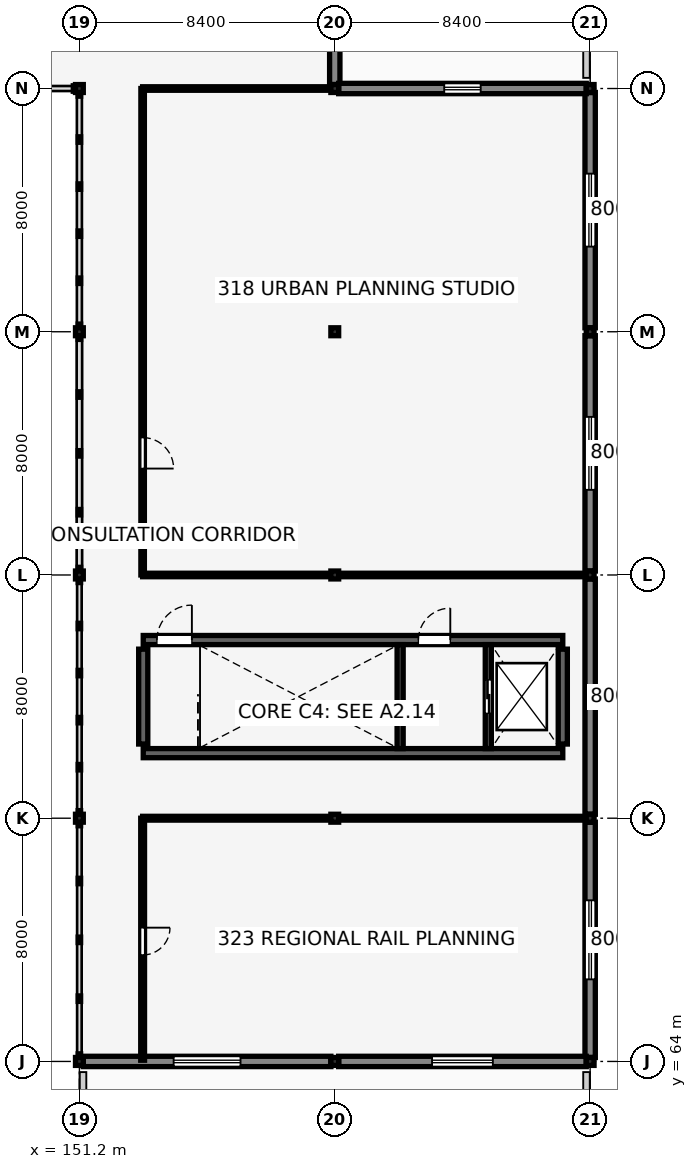
"""IFC4 building model, lengths in metres.
Left out: names, types, materials, properties, quantities, classifications, styles, units other than length and angle.
Written with IfcOpenShell. Run it as: python <this file> out.ifc"""

import sys

from ifc_helpers import new_model, si_unit, direction, frame, frame_2d, origin, origin_2d, place, context, subcontext, project, spatial, rectangle, i_section, extrude, element, fill, save


model = new_model("IFC4")
c1 = context("Model", 3, precision=1e-05, world=origin(), true_north=direction((0.0, 1.0)))
c2 = subcontext(c1, "Body", "Model", "MODEL_VIEW")
j1 = project(units=[si_unit("LENGTHUNIT", "METRE"), si_unit("PLANEANGLEUNIT", "RADIAN")], contexts=[c1])
p1 = place(None, origin())
s1 = spatial("IfcSite", under=j1, at=p1, CompositionType="ELEMENT")
p2 = place(p1, origin())
s2 = spatial("IfcBuilding", under=s1, at=p2, CompositionType="ELEMENT")
p3 = place(p2, frame((0.0, 0.0, 13.36)))
s3 = spatial("IfcBuildingStorey", under=s2, at=p3, CompositionType="ELEMENT", Elevation=13.36)
p4 = place(p3, frame((153.3, 74.14, 0.0), z_axis=(0.0, 0.0, 1.0), x_axis=(1.0, 0.0, 0.0)))
e1 = element("IfcWall", 1, at=p4, inside=s3, PredefinedType="SHEAR", context=c2, shape_type="SweptSolid", body=[
    extrude(rectangle(XDim=13.8, YDim=0.3, at=frame_2d((6.9, 0.0))), origin(), (0.0, 0.0, 1.0), 3.58),
])
p5 = place(p3, frame((153.3, 77.86, 0.0), z_axis=(0.0, 0.0, 1.0), x_axis=(1.0, 0.0, 0.0)))
e2 = element("IfcWall", 2, at=p5, inside=s3, PredefinedType="SHEAR", context=c2, shape_type="SweptSolid", body=[
    extrude(rectangle(XDim=13.8, YDim=0.3, at=frame_2d((6.9, 0.0))), origin(), (0.0, 0.0, 1.0), 3.58),
])
p6 = place(p5, frame((0.45, 0.0, 0.0), z_axis=(0.0, 0.0, 1.0), x_axis=(1.0, 0.0, 0.0)))
e3 = element("IfcOpeningElement", 3, at=p6, cuts=e2, PredefinedType="OPENING", context=c2, shape_type="SweptSolid", body=[
    extrude(rectangle(XDim=1.15, YDim=2.15, at=frame_2d((0.575, 1.075))), frame((0.0, 0.16, 0.0), z_axis=(0.0, -1.0, 0.0), x_axis=(1.0, 0.0, 0.0)), (0.0, 0.0, 1.0), 0.32),
])
p7 = place(p5, frame((9.05, 0.0, 0.0), z_axis=(0.0, 0.0, 1.0), x_axis=(1.0, 0.0, 0.0)))
e4 = element("IfcOpeningElement", 4, at=p7, cuts=e2, PredefinedType="OPENING", context=c2, shape_type="SweptSolid", body=[
    extrude(rectangle(XDim=1.05, YDim=2.15, at=frame_2d((0.525, 1.075))), frame((0.0, 0.16, 0.0), z_axis=(0.0, -1.0, 0.0), x_axis=(1.0, 0.0, 0.0)), (0.0, 0.0, 1.0), 0.32),
])
for number, where, z_axis, x_axis in (
    (5, (153.3, 74.44, 0.0), (0.0, 0.0, 1.0), (0.0, 1.0, 0.0)),
    (6, (167.1, 74.44, 0.0), (0.0, 0.0, 1.0), (0.0, 1.0, 0.0)),
):
    element("IfcWall", number, at=place(p3, frame(where, z_axis=z_axis, x_axis=x_axis)), inside=s3, PredefinedType="SHEAR", context=c2, shape_type="SweptSolid", body=[
        extrude(rectangle(XDim=3.12, YDim=0.3, at=frame_2d((1.56, 0.0))), origin(), (0.0, 0.0, 1.0), 3.58),
    ])
for number, where, z_axis, x_axis in (
    (7, (151.2, 64.0, 0.0), (0.0, 0.0, 1.0), (1.0, 0.0, 0.0)),
    (8, (151.2, 72.0, 0.0), (0.0, 0.0, 1.0), (1.0, 0.0, 0.0)),
    (9, (151.2, 80.0, 0.0), (0.0, 0.0, 1.0), (1.0, 0.0, 0.0)),
    (10, (151.2, 88.0, 0.0), (0.0, 0.0, 1.0), (1.0, 0.0, 0.0)),
    (11, (151.2, 96.0, 0.0), (0.0, 0.0, 1.0), (1.0, 0.0, 0.0)),
    (12, (159.6, 64.0, 0.0), (0.0, 0.0, 1.0), (1.0, 0.0, 0.0)),
    (13, (159.6, 72.0, 0.0), (0.0, 0.0, 1.0), (1.0, 0.0, 0.0)),
    (14, (159.6, 80.0, 0.0), (0.0, 0.0, 1.0), (1.0, 0.0, 0.0)),
    (15, (159.6, 88.0, 0.0), (0.0, 0.0, 1.0), (1.0, 0.0, 0.0)),
    (16, (159.6, 96.0, 0.0), (0.0, 0.0, 1.0), (1.0, 0.0, 0.0)),
    (17, (168.0, 64.0, 0.0), (0.0, 0.0, 1.0), (1.0, 0.0, 0.0)),
    (18, (168.0, 72.0, 0.0), (0.0, 0.0, 1.0), (1.0, 0.0, 0.0)),
    (19, (168.0, 80.0, 0.0), (0.0, 0.0, 1.0), (1.0, 0.0, 0.0)),
    (20, (168.0, 88.0, 0.0), (0.0, 0.0, 1.0), (1.0, 0.0, 0.0)),
    (21, (168.0, 96.0, 0.0), (0.0, 0.0, 1.0), (1.0, 0.0, 0.0)),
):
    element("IfcColumn", number, at=place(p3, frame(where, z_axis=z_axis, x_axis=x_axis)), inside=s3, PredefinedType="COLUMN", context=c2, shape_type="SweptSolid", body=[
        extrude(i_section(OverallWidth=0.256, OverallDepth=0.26, WebThickness=0.01, FlangeThickness=0.017, FilletRadius=0.013, at=origin_2d()), origin(), (0.0, 0.0, 1.0), 3.58),
    ])
p8 = place(p3, frame((168.0, 64.13, 0.0), z_axis=(0.0, 0.0, 1.0), x_axis=(0.0, 1.0, 0.0)))
e22 = element("IfcWall", 22, at=p8, inside=s3, PredefinedType="SOLIDWALL", context=c2, shape_type="SweptSolid", body=[
    extrude(rectangle(XDim=7.74, YDim=0.34, at=frame_2d((3.87, 0.0))), origin(), (0.0, 0.0, 1.0), 3.28),
])
p9 = place(p8, frame((2.57, 0.0, 0.9), z_axis=(0.0, 0.0, 1.0), x_axis=(1.0, 0.0, 0.0)))
e23 = element("IfcOpeningElement", 23, at=p9, cuts=e22, PredefinedType="OPENING", context=c2, shape_type="SweptSolid", body=[
    extrude(rectangle(XDim=2.6, YDim=1.8, at=frame_2d((1.3, 0.9))), frame((0.0, 0.18, 0.0), z_axis=(0.0, -1.0, 0.0), x_axis=(1.0, 0.0, 0.0)), (0.0, 0.0, 1.0), 0.36),
])
p10 = place(p3, frame((168.0, 72.13, 0.0), z_axis=(0.0, 0.0, 1.0), x_axis=(0.0, 1.0, 0.0)))
e24 = element("IfcWall", 24, at=p10, inside=s3, PredefinedType="SOLIDWALL", context=c2, shape_type="SweptSolid", body=[
    extrude(rectangle(XDim=7.74, YDim=0.34, at=frame_2d((3.87, 0.0))), origin(), (0.0, 0.0, 1.0), 3.28),
])
p11 = place(p3, frame((168.0, 80.13, 0.0), z_axis=(0.0, 0.0, 1.0), x_axis=(0.0, 1.0, 0.0)))
e25 = element("IfcWall", 25, at=p11, inside=s3, PredefinedType="SOLIDWALL", context=c2, shape_type="SweptSolid", body=[
    extrude(rectangle(XDim=7.74, YDim=0.34, at=frame_2d((3.87, 0.0))), origin(), (0.0, 0.0, 1.0), 3.28),
])
p12 = place(p11, frame((2.67, 0.0, 0.9), z_axis=(0.0, 0.0, 1.0), x_axis=(1.0, 0.0, 0.0)))
e26 = element("IfcOpeningElement", 26, at=p12, cuts=e25, PredefinedType="OPENING", context=c2, shape_type="SweptSolid", body=[
    extrude(rectangle(XDim=2.4, YDim=1.75, at=frame_2d((1.2, 0.875))), frame((0.0, 0.18, 0.0), z_axis=(0.0, -1.0, 0.0), x_axis=(1.0, 0.0, 0.0)), (0.0, 0.0, 1.0), 0.36),
])
p13 = place(p3, frame((168.0, 88.13, 0.0), z_axis=(0.0, 0.0, 1.0), x_axis=(0.0, 1.0, 0.0)))
e27 = element("IfcWall", 27, at=p13, inside=s3, PredefinedType="SOLIDWALL", context=c2, shape_type="SweptSolid", body=[
    extrude(rectangle(XDim=7.74, YDim=0.34, at=frame_2d((3.87, 0.0))), origin(), (0.0, 0.0, 1.0), 3.28),
])
p14 = place(p13, frame((2.67, 0.0, 0.9), z_axis=(0.0, 0.0, 1.0), x_axis=(1.0, 0.0, 0.0)))
e28 = element("IfcOpeningElement", 28, at=p14, cuts=e27, PredefinedType="OPENING", context=c2, shape_type="SweptSolid", body=[
    extrude(rectangle(XDim=2.4, YDim=1.5, at=frame_2d((1.2, 0.75))), frame((0.0, 0.18, 0.0), z_axis=(0.0, -1.0, 0.0), x_axis=(1.0, 0.0, 0.0)), (0.0, 0.0, 1.0), 0.36),
])
p15 = place(p3, frame((151.328, 64.0, 0.0), z_axis=(0.0, 0.0, 1.0), x_axis=(1.0, 0.0, 0.0)))
e29 = element("IfcWall", 29, at=p15, inside=s3, PredefinedType="SOLIDWALL", context=c2, shape_type="SweptSolid", body=[
    extrude(rectangle(XDim=8.144, YDim=0.34, at=frame_2d((4.072, 0.0))), origin(), (0.0, 0.0, 1.0), 3.28),
])
p16 = place(p15, frame((2.972, 0.0, 0.9), z_axis=(0.0, 0.0, 1.0), x_axis=(1.0, 0.0, 0.0)))
e30 = element("IfcOpeningElement", 30, at=p16, cuts=e29, PredefinedType="OPENING", context=c2, shape_type="SweptSolid", body=[
    extrude(rectangle(XDim=2.2, YDim=1.5, at=frame_2d((1.1, 0.75))), frame((0.0, 0.18, 0.0), z_axis=(0.0, -1.0, 0.0), x_axis=(1.0, 0.0, 0.0)), (0.0, 0.0, 1.0), 0.36),
])
p17 = place(p3, frame((159.728, 64.0, 0.0), z_axis=(0.0, 0.0, 1.0), x_axis=(1.0, 0.0, 0.0)))
e31 = element("IfcWall", 31, at=p17, inside=s3, PredefinedType="SOLIDWALL", context=c2, shape_type="SweptSolid", body=[
    extrude(rectangle(XDim=8.144, YDim=0.34, at=frame_2d((4.072, 0.0))), origin(), (0.0, 0.0, 1.0), 3.28),
])
p18 = place(p17, frame((3.072, 0.0, 0.9), z_axis=(0.0, 0.0, 1.0), x_axis=(1.0, 0.0, 0.0)))
e32 = element("IfcOpeningElement", 32, at=p18, cuts=e31, PredefinedType="OPENING", context=c2, shape_type="SweptSolid", body=[
    extrude(rectangle(XDim=2.0, YDim=1.5, at=frame_2d((1.0, 0.75))), frame((0.0, 0.18, 0.0), z_axis=(0.0, -1.0, 0.0), x_axis=(1.0, 0.0, 0.0)), (0.0, 0.0, 1.0), 0.36),
])
p19 = place(p3, frame((159.6, 96.13, 0.0), z_axis=(0.0, 0.0, 1.0), x_axis=(0.0, 1.0, 0.0)))
e33 = element("IfcWall", 33, at=p19, inside=s3, PredefinedType="SOLIDWALL", context=c2, shape_type="SweptSolid", body=[
    extrude(rectangle(XDim=7.74, YDim=0.34, at=frame_2d((3.87, 0.0))), origin(), (0.0, 0.0, 1.0), 3.28),
])
p20 = place(p19, frame((3.395, 0.0, 0.65), z_axis=(0.0, 0.0, 1.0), x_axis=(1.0, 0.0, 0.0)))
e34 = element("IfcOpeningElement", 34, at=p20, cuts=e33, PredefinedType="OPENING", context=c2, shape_type="SweptSolid", body=[
    extrude(rectangle(XDim=0.95, YDim=2.1, at=frame_2d((0.475, 1.05))), frame((0.0, 0.18, 0.0), z_axis=(0.0, -1.0, 0.0), x_axis=(1.0, 0.0, 0.0)), (0.0, 0.0, 1.0), 0.36),
])
p21 = place(p3, frame((159.728, 96.0, 0.0), z_axis=(0.0, 0.0, 1.0), x_axis=(1.0, 0.0, 0.0)))
e35 = element("IfcWall", 35, at=p21, inside=s3, PredefinedType="SOLIDWALL", context=c2, shape_type="SweptSolid", body=[
    extrude(rectangle(XDim=8.144, YDim=0.34, at=frame_2d((4.072, 0.0))), origin(), (0.0, 0.0, 1.0), 3.28),
])
p22 = place(p21, frame((3.472, 0.0, 1.55), z_axis=(0.0, 0.0, 1.0), x_axis=(1.0, 0.0, 0.0)))
e36 = element("IfcOpeningElement", 36, at=p22, cuts=e35, PredefinedType="OPENING", context=c2, shape_type="SweptSolid", body=[
    extrude(rectangle(XDim=1.2, YDim=0.95, at=frame_2d((0.6, 0.475))), frame((0.0, 0.18, 0.0), z_axis=(0.0, -1.0, 0.0), x_axis=(1.0, 0.0, 0.0)), (0.0, 0.0, 1.0), 0.36),
])
for number, where, z_axis, x_axis in (
    (37, (167.88, 63.65, 0.0), (0.0, 0.0, 1.0), (0.0, -1.0, 0.0)),
    (38, (151.32, 56.12, 0.0), (0.0, 0.0, 1.0), (0.0, 1.0, 0.0)),
):
    element("IfcWall", number, at=place(p3, frame(where, z_axis=z_axis, x_axis=x_axis)), inside=s3, PredefinedType="PARAPET", context=c2, shape_type="SweptSolid", body=[
        extrude(rectangle(XDim=7.53, YDim=0.215, at=frame_2d((3.765, 0.0))), origin(), (0.0, 0.0, 1.0), 1.05),
    ])
p23 = place(p3, frame((167.88, 111.88, 0.0), z_axis=(0.0, 0.0, 1.0), x_axis=(0.0, -1.0, 0.0)))
e39 = element("IfcWall", 39, at=p23, inside=s3, PredefinedType="PARAPET", context=c2, shape_type="SweptSolid", body=[
    extrude(rectangle(XDim=15.53, YDim=0.215, at=frame_2d((7.765, 0.0))), origin(), (0.0, 0.0, 1.0), 1.05),
])
p24 = place(p3, frame((161.75, 74.29, 0.0), z_axis=(0.0, 0.0, 1.0), x_axis=(0.0, 1.0, 0.0)))
e40 = element("IfcWall", 40, at=p24, inside=s3, PredefinedType="SHEAR", context=c2, shape_type="SweptSolid", body=[
    extrude(rectangle(XDim=3.42, YDim=0.2, at=frame_2d((1.71, 0.0))), origin(), (0.0, 0.0, 1.0), 3.58),
])
p25 = place(p3, frame((164.65, 74.29, 0.0), z_axis=(0.0, 0.0, 1.0), x_axis=(0.0, 1.0, 0.0)))
e41 = element("IfcWall", 41, at=p25, inside=s3, PredefinedType="SHEAR", context=c2, shape_type="SweptSolid", body=[
    extrude(rectangle(XDim=3.42, YDim=0.2, at=frame_2d((1.71, 0.0))), origin(), (0.0, 0.0, 1.0), 3.58),
])
p26 = place(p25, frame((1.16, 0.0, 0.0), z_axis=(0.0, 0.0, 1.0), x_axis=(1.0, 0.0, 0.0)))
e42 = element("IfcOpeningElement", 42, at=p26, cuts=e41, PredefinedType="OPENING", context=c2, shape_type="SweptSolid", body=[
    extrude(rectangle(XDim=1.1, YDim=2.15, at=frame_2d((0.55, 1.075))), frame((0.0, 0.11, 0.0), z_axis=(0.0, -1.0, 0.0), x_axis=(1.0, 0.0, 0.0)), (0.0, 0.0, 1.0), 0.22),
])
p27 = place(p3, frame((153.28, 64.04, 0.0), z_axis=(0.0, 0.0, 1.0), x_axis=(0.0, 1.0, 0.0)))
e43 = element("IfcWall", 43, at=p27, inside=s3, PredefinedType="PARTITIONING", context=c2, shape_type="SweptSolid", body=[
    extrude(rectangle(XDim=7.96, YDim=0.125, at=frame_2d((3.98, 0.0))), origin(), (0.0, 0.0, 1.0), 3.58),
])
p28 = place(p27, frame((4.36, 0.0, 0.0), z_axis=(0.0, 0.0, 1.0), x_axis=(-1.0, 0.0, 0.0)))
e44 = element("IfcOpeningElement", 44, at=p28, cuts=e43, PredefinedType="OPENING", context=c2, shape_type="SweptSolid", body=[
    extrude(rectangle(XDim=0.9, YDim=2.1, at=frame_2d((0.45, 1.05))), frame((0.0, 0.073, 0.0), z_axis=(0.0, -1.0, 0.0), x_axis=(1.0, 0.0, 0.0)), (0.0, 0.0, 1.0), 0.145),
])
p29 = place(p3, frame((153.28, 80.0, 0.0), z_axis=(0.0, 0.0, 1.0), x_axis=(0.0, 1.0, 0.0)))
e45 = element("IfcWall", 45, at=p29, inside=s3, PredefinedType="PARTITIONING", context=c2, shape_type="SweptSolid", body=[
    extrude(rectangle(XDim=16.0, YDim=0.115, at=frame_2d((8.0, 0.0))), origin(), (0.0, 0.0, 1.0), 3.58),
])
p30 = place(p29, frame((4.52, 0.0, 0.0), z_axis=(0.0, 0.0, 1.0), x_axis=(-1.0, 0.0, 0.0)))
e46 = element("IfcOpeningElement", 46, at=p30, cuts=e45, PredefinedType="OPENING", context=c2, shape_type="SweptSolid", body=[
    extrude(rectangle(XDim=1.02, YDim=2.16, at=frame_2d((0.51, 1.08))), frame((0.0, 0.067, 0.0), z_axis=(0.0, -1.0, 0.0), x_axis=(1.0, 0.0, 0.0)), (0.0, 0.0, 1.0), 0.135),
])
p31 = place(p3, frame((153.28, 72.0, 0.0), z_axis=(0.0, 0.0, 1.0), x_axis=(1.0, 0.0, 0.0)))
e47 = element("IfcWall", 47, at=p31, inside=s3, PredefinedType="PARTITIONING", context=c2, shape_type="SweptSolid", body=[
    extrude(rectangle(XDim=6.202, YDim=0.125, at=frame_2d((3.101, 0.0))), origin(), (0.0, 0.0, 1.0), 3.123),
])
p32 = place(p3, frame((159.718, 72.0, 0.0), z_axis=(0.0, 0.0, 1.0), x_axis=(1.0, 0.0, 0.0)))
e48 = element("IfcWall", 48, at=p32, inside=s3, PredefinedType="PARTITIONING", context=c2, shape_type="SweptSolid", body=[
    extrude(rectangle(XDim=8.164, YDim=0.125, at=frame_2d((4.082, 0.0))), origin(), (0.0, 0.0, 1.0), 3.123),
])
p33 = place(p3, frame((153.28, 80.0, 0.0), z_axis=(0.0, 0.0, 1.0), x_axis=(1.0, 0.0, 0.0)))
e49 = element("IfcWall", 49, at=p33, inside=s3, PredefinedType="PARTITIONING", context=c2, shape_type="SweptSolid", body=[
    extrude(rectangle(XDim=6.202, YDim=0.115, at=frame_2d((3.101, 0.0))), origin(), (0.0, 0.0, 1.0), 3.123),
])
p34 = place(p3, frame((159.718, 80.0, 0.0), z_axis=(0.0, 0.0, 1.0), x_axis=(1.0, 0.0, 0.0)))
e50 = element("IfcWall", 50, at=p34, inside=s3, PredefinedType="PARTITIONING", context=c2, shape_type="SweptSolid", body=[
    extrude(rectangle(XDim=8.164, YDim=0.115, at=frame_2d((4.082, 0.0))), origin(), (0.0, 0.0, 1.0), 3.123),
])
p35 = place(p3, frame((153.28, 96.0, 0.0), z_axis=(0.0, 0.0, 1.0), x_axis=(1.0, 0.0, 0.0)))
e51 = element("IfcWall", 51, at=p35, inside=s3, PredefinedType="PARTITIONING", context=c2, shape_type="SweptSolid", body=[
    extrude(rectangle(XDim=6.202, YDim=0.115, at=frame_2d((3.101, 0.0))), origin(), (0.0, 0.0, 1.0), 3.123),
])
p36 = place(p9, origin())
e52 = element("IfcWindow", 52, at=p36, inside=s3, PartitioningType="DOUBLE_PANEL_VERTICAL", PredefinedType="WINDOW", context=c2, shape_type="SweptSolid", body=[
    extrude(rectangle(XDim=2.6, YDim=1.8, at=frame_2d((1.3, 0.9))), frame((0.0, 0.03, 0.0), z_axis=(0.0, -1.0, 0.0), x_axis=(1.0, 0.0, 0.0)), (0.0, 0.0, 1.0), 0.06),
])
fill(e23, e52)
p37 = place(p12, origin())
e53 = element("IfcWindow", 53, at=p37, inside=s3, PartitioningType="DOUBLE_PANEL_VERTICAL", PredefinedType="WINDOW", context=c2, shape_type="SweptSolid", body=[
    extrude(rectangle(XDim=2.4, YDim=1.75, at=frame_2d((1.2, 0.875))), frame((0.0, 0.03, 0.0), z_axis=(0.0, -1.0, 0.0), x_axis=(1.0, 0.0, 0.0)), (0.0, 0.0, 1.0), 0.06),
])
fill(e26, e53)
p38 = place(p14, origin())
e54 = element("IfcWindow", 54, at=p38, inside=s3, PartitioningType="DOUBLE_PANEL_VERTICAL", PredefinedType="WINDOW", context=c2, shape_type="SweptSolid", body=[
    extrude(rectangle(XDim=2.4, YDim=1.5, at=frame_2d((1.2, 0.75))), frame((0.0, 0.03, 0.0), z_axis=(0.0, -1.0, 0.0), x_axis=(1.0, 0.0, 0.0)), (0.0, 0.0, 1.0), 0.06),
])
fill(e28, e54)
p39 = place(p16, origin())
e55 = element("IfcWindow", 55, at=p39, inside=s3, PartitioningType="DOUBLE_PANEL_VERTICAL", PredefinedType="WINDOW", context=c2, shape_type="SweptSolid", body=[
    extrude(rectangle(XDim=2.2, YDim=1.5, at=frame_2d((1.1, 0.75))), frame((0.0, 0.03, 0.0), z_axis=(0.0, -1.0, 0.0), x_axis=(1.0, 0.0, 0.0)), (0.0, 0.0, 1.0), 0.06),
])
fill(e30, e55)
p40 = place(p18, origin())
e56 = element("IfcWindow", 56, at=p40, inside=s3, PartitioningType="DOUBLE_PANEL_VERTICAL", PredefinedType="WINDOW", context=c2, shape_type="SweptSolid", body=[
    extrude(rectangle(XDim=2.0, YDim=1.5, at=frame_2d((1.0, 0.75))), frame((0.0, 0.03, 0.0), z_axis=(0.0, -1.0, 0.0), x_axis=(1.0, 0.0, 0.0)), (0.0, 0.0, 1.0), 0.06),
])
fill(e32, e56)
p41 = place(p22, origin())
e57 = element("IfcWindow", 57, at=p41, inside=s3, PartitioningType="SINGLE_PANEL", PredefinedType="WINDOW", context=c2, shape_type="SweptSolid", body=[
    extrude(rectangle(XDim=1.2, YDim=0.95, at=frame_2d((0.6, 0.475))), frame((0.0, 0.03, 0.0), z_axis=(0.0, -1.0, 0.0), x_axis=(1.0, 0.0, 0.0)), (0.0, 0.0, 1.0), 0.06),
])
fill(e36, e57)
p42 = place(p6, origin())
e58 = element("IfcDoor", 58, at=p42, inside=s3, OperationType="SINGLE_SWING_RIGHT", PredefinedType="DOOR", context=c2, shape_type="SweptSolid", body=[
    extrude(rectangle(XDim=1.15, YDim=2.15, at=frame_2d((0.575, 1.075))), frame((0.0, 0.025, 0.0), z_axis=(0.0, -1.0, 0.0), x_axis=(1.0, 0.0, 0.0)), (0.0, 0.0, 1.0), 0.05),
])
fill(e3, e58)
p43 = place(p7, origin())
e59 = element("IfcDoor", 59, at=p43, inside=s3, OperationType="SINGLE_SWING_RIGHT", PredefinedType="DOOR", context=c2, shape_type="SweptSolid", body=[
    extrude(rectangle(XDim=1.05, YDim=2.15, at=frame_2d((0.525, 1.075))), frame((0.0, 0.025, 0.0), z_axis=(0.0, -1.0, 0.0), x_axis=(1.0, 0.0, 0.0)), (0.0, 0.0, 1.0), 0.05),
])
fill(e4, e59)
p44 = place(p26, origin())
e60 = element("IfcDoor", 60, at=p44, inside=s3, OperationType="DOUBLE_DOOR_SLIDING", PredefinedType="DOOR", context=c2, shape_type="SweptSolid", body=[
    extrude(rectangle(XDim=1.1, YDim=2.15, at=frame_2d((0.55, 1.075))), frame((0.0, 0.025, 0.0), z_axis=(0.0, -1.0, 0.0), x_axis=(1.0, 0.0, 0.0)), (0.0, 0.0, 1.0), 0.05),
])
fill(e42, e60)
p45 = place(p28, origin())
e61 = element("IfcDoor", 61, at=p45, inside=s3, OperationType="SINGLE_SWING_LEFT", PredefinedType="DOOR", context=c2, shape_type="SweptSolid", body=[
    extrude(rectangle(XDim=0.9, YDim=2.1, at=frame_2d((0.45, 1.05))), frame((0.0, 0.025, 0.0), z_axis=(0.0, -1.0, 0.0), x_axis=(1.0, 0.0, 0.0)), (0.0, 0.0, 1.0), 0.05),
])
fill(e44, e61)
p46 = place(p30, origin())
e62 = element("IfcDoor", 62, at=p46, inside=s3, OperationType="SINGLE_SWING_RIGHT", PredefinedType="DOOR", context=c2, shape_type="SweptSolid", body=[
    extrude(rectangle(XDim=1.02, YDim=2.16, at=frame_2d((0.51, 1.08))), frame((0.0, 0.025, 0.0), z_axis=(0.0, -1.0, 0.0), x_axis=(1.0, 0.0, 0.0)), (0.0, 0.0, 1.0), 0.05),
])
fill(e46, e62)
save(model, sys.argv[1])
